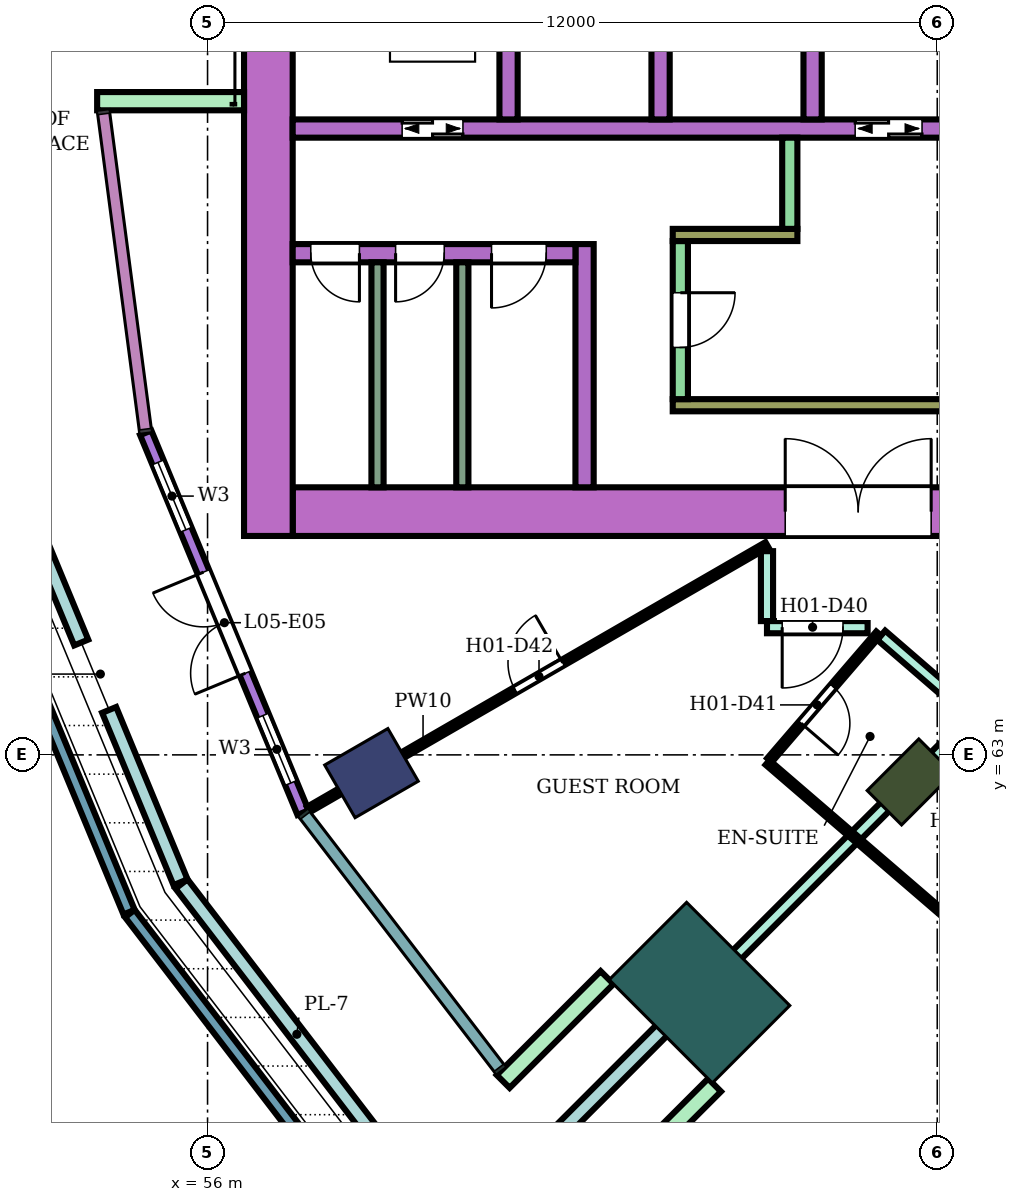
"""IFC4 building model, lengths in metres.
Left out: names, types, materials, properties, quantities, classifications, styles, units other than length and angle.
Written with IfcOpenShell. Run it as: python <this file> out.ifc"""

import sys

from ifc_helpers import new_model, si_unit, direction, frame, frame_2d, origin, origin_2d, place, context, subcontext, project, spatial, rectangle, extrude, element, fill, save


model = new_model("IFC4")
c1 = context("Model", 3, precision=1e-05, world=origin(), true_north=direction((0.0, 1.0)))
c2 = subcontext(c1, "Body", "Model", "MODEL_VIEW")
j1 = project(units=[si_unit("LENGTHUNIT", "METRE"), si_unit("PLANEANGLEUNIT", "RADIAN")], contexts=[c1])
p1 = place(None, origin())
s1 = spatial("IfcSite", under=j1, at=p1, CompositionType="ELEMENT")
p2 = place(p1, origin())
s2 = spatial("IfcBuilding", under=s1, at=p2, CompositionType="ELEMENT")
p3 = place(p2, frame((0.0, 0.0, 28.8)))
s3 = spatial("IfcBuildingStorey", under=s2, at=p3, CompositionType="ELEMENT", Elevation=28.8)
p4 = place(p3, frame((58.696, 62.7, 0.0), z_axis=(0.0, 0.0, 1.0), x_axis=(-0.866025403784, -0.5, 0.0)))
e1 = element("IfcColumn", 1, at=p4, inside=s3, PredefinedType="COLUMN", context=c2, shape_type="SweptSolid", body=[
    extrude(rectangle(XDim=1.2, YDim=1.0, at=origin_2d()), origin(), (0.0, 0.0, 1.0), 3.8),
])
p5 = place(p3, frame((67.555, 62.555, 0.0), z_axis=(0.0, 0.0, 1.0), x_axis=(-0.707106781187, -0.707106781187, 0.0)))
e2 = element("IfcColumn", 2, at=p5, inside=s3, PredefinedType="COLUMN", context=c2, shape_type="SweptSolid", body=[
    extrude(rectangle(XDim=1.2, YDim=0.8, at=origin_2d()), origin(), (0.0, 0.0, 1.0), 3.8),
])
p6 = place(p3, frame((64.09, 59.09, 0.0), z_axis=(0.0, 0.0, 1.0), x_axis=(-0.707106781187, -0.707106781187, 0.0)))
e3 = element("IfcColumn", 3, at=p6, inside=s3, PredefinedType="COLUMN", context=c2, shape_type="SweptSolid", body=[
    extrude(rectangle(XDim=1.8, YDim=2.4, at=origin_2d()), origin(), (0.0, 0.0, 1.0), 3.8),
])
p7 = place(p3, frame((72.1, 67.0, 0.0), z_axis=(0.0, 0.0, 1.0), x_axis=(-1.0, 0.0, 0.0)))
e4 = element("IfcWall", 4, at=p7, inside=s3, PredefinedType="SHEAR", context=c2, shape_type="SweptSolid", body=[
    extrude(rectangle(XDim=14.7, YDim=0.8, at=frame_2d((7.35, 0.0))), origin(), (0.0, 0.0, 1.0), 3.48),
])
p8 = place(p7, frame((4.2, 0.0, 0.0)))
e5 = element("IfcOpeningElement", 5, at=p8, cuts=e4, PredefinedType="OPENING", context=c2, shape_type="SweptSolid", body=[
    extrude(rectangle(XDim=2.4, YDim=2.4, at=frame_2d((1.2, 1.2))), frame((0.0, 0.41, 0.0), z_axis=(0.0, -1.0, 0.0), x_axis=(1.0, 0.0, 0.0)), (0.0, 0.0, 1.0), 0.82),
])
p9 = place(p3, frame((57.0, 83.4, 0.0), z_axis=(0.0, 0.0, 1.0), x_axis=(0.0, -1.0, 0.0)))
e6 = element("IfcWall", 6, at=p9, inside=s3, PredefinedType="SHEAR", context=c2, shape_type="SweptSolid", body=[
    extrude(rectangle(XDim=16.8, YDim=0.8, at=frame_2d((8.4, 0.0))), origin(), (0.0, 0.0, 1.0), 3.48),
])
p10 = place(p3, frame((68.3, 73.3, 0.0), z_axis=(0.0, 0.0, 1.0), x_axis=(-1.0, 0.0, 0.0)))
e7 = element("IfcWall", 7, at=p10, inside=s3, PredefinedType="SHEAR", context=c2, shape_type="SweptSolid", body=[
    extrude(rectangle(XDim=10.9, YDim=0.3, at=frame_2d((5.45, 0.0))), origin(), (0.0, 0.0, 1.0), 3.48),
])
p11 = place(p10, frame((0.55, 0.0, 0.0)))
e8 = element("IfcOpeningElement", 8, at=p11, cuts=e7, PredefinedType="OPENING", context=c2, shape_type="SweptSolid", body=[
    extrude(rectangle(XDim=1.1, YDim=2.1, at=frame_2d((0.55, 1.05))), frame((0.0, 0.16, 0.0), z_axis=(0.0, -1.0, 0.0), x_axis=(1.0, 0.0, 0.0)), (0.0, 0.0, 1.0), 0.32),
])
p12 = place(p10, frame((8.1, 0.0, 0.0)))
e9 = element("IfcOpeningElement", 9, at=p12, cuts=e7, PredefinedType="OPENING", context=c2, shape_type="SweptSolid", body=[
    extrude(rectangle(XDim=1.0, YDim=2.1, at=frame_2d((0.5, 1.05))), frame((0.0, 0.16, 0.0), z_axis=(0.0, -1.0, 0.0), x_axis=(1.0, 0.0, 0.0)), (0.0, 0.0, 1.0), 0.32),
])
for number, where, z_axis, x_axis in (
    (10, (65.95, 76.0, 0.0), (0.0, 0.0, 1.0), (0.0, -1.0, 0.0)),
    (11, (63.45, 76.0, 0.0), (0.0, 0.0, 1.0), (0.0, -1.0, 0.0)),
    (12, (60.95, 76.0, 0.0), (0.0, 0.0, 1.0), (0.0, -1.0, 0.0)),
):
    element("IfcWall", number, at=place(p3, frame(where, z_axis=z_axis, x_axis=x_axis)), inside=s3, PredefinedType="SHEAR", context=c2, shape_type="SweptSolid", body=[
        extrude(rectangle(XDim=2.55, YDim=0.3, at=frame_2d((1.275, 0.0))), origin(), (0.0, 0.0, 1.0), 3.48),
    ])
p13 = place(p3, frame((68.3, 68.75, 0.0), z_axis=(0.0, 0.0, 1.0), x_axis=(-1.0, 0.0, 0.0)))
e13 = element("IfcWall", 13, at=p13, inside=s3, PredefinedType="SHEAR", context=c2, shape_type="SweptSolid", body=[
    extrude(rectangle(XDim=4.65, YDim=0.2, at=frame_2d((2.325, 0.0))), origin(), (0.0, 0.0, 1.0), 3.48),
])
p14 = place(p3, frame((63.775, 71.45, 0.0), z_axis=(0.0, 0.0, 1.0), x_axis=(0.0, -1.0, 0.0)))
e14 = element("IfcWall", 14, at=p14, inside=s3, PredefinedType="SHEAR", context=c2, shape_type="SweptSolid", body=[
    extrude(rectangle(XDim=2.6, YDim=0.25, at=frame_2d((1.3, 0.0))), origin(), (0.0, 0.0, 1.0), 3.48),
])
p15 = place(p14, frame((0.85, 0.0, 0.0)))
e15 = element("IfcOpeningElement", 15, at=p15, cuts=e14, PredefinedType="OPENING", context=c2, shape_type="SweptSolid", body=[
    extrude(rectangle(XDim=0.9, YDim=2.1, at=frame_2d((0.45, 1.05))), frame((0.0, 0.135, 0.0), z_axis=(0.0, -1.0, 0.0), x_axis=(1.0, 0.0, 0.0)), (0.0, 0.0, 1.0), 0.27),
])
p16 = place(p3, frame((65.7, 71.55, 0.0), z_axis=(0.0, 0.0, 1.0), x_axis=(-1.0, 0.0, 0.0)))
e16 = element("IfcWall", 16, at=p16, inside=s3, PredefinedType="SHEAR", context=c2, shape_type="SweptSolid", body=[
    extrude(rectangle(XDim=2.05, YDim=0.2, at=frame_2d((1.025, 0.0))), origin(), (0.0, 0.0, 1.0), 3.48),
])
p17 = place(p3, frame((65.575, 73.15, 0.0), z_axis=(0.0, 0.0, 1.0), x_axis=(0.0, -1.0, 0.0)))
e17 = element("IfcWall", 17, at=p17, inside=s3, PredefinedType="SHEAR", context=c2, shape_type="SweptSolid", body=[
    extrude(rectangle(XDim=1.5, YDim=0.25, at=frame_2d((0.75, 0.0))), origin(), (0.0, 0.0, 1.0), 3.48),
])
p18 = place(p3, frame((62.2, 71.4, 0.0), z_axis=(0.0, 0.0, 1.0), x_axis=(0.0, -1.0, 0.0)))
e18 = element("IfcWall", 18, at=p18, inside=s3, PredefinedType="SHEAR", context=c2, shape_type="SweptSolid", body=[
    extrude(rectangle(XDim=4.0, YDim=0.3, at=frame_2d((2.0, 0.0))), origin(), (0.0, 0.0, 1.0), 3.48),
])
p19 = place(p3, frame((62.05, 71.25, 0.0), z_axis=(0.0, 0.0, 1.0), x_axis=(-1.0, 0.0, 0.0)))
e19 = element("IfcWall", 19, at=p19, inside=s3, PredefinedType="SHEAR", context=c2, shape_type="SweptSolid", body=[
    extrude(rectangle(XDim=4.65, YDim=0.3, at=frame_2d((2.325, 0.0))), origin(), (0.0, 0.0, 1.0), 3.48),
])
p20 = place(p19, frame((0.48, 0.0, 0.0)))
e20 = element("IfcOpeningElement", 20, at=p20, cuts=e19, PredefinedType="OPENING", context=c2, shape_type="SweptSolid", body=[
    extrude(rectangle(XDim=0.9, YDim=2.1, at=frame_2d((0.45, 1.05))), frame((0.0, 0.16, 0.0), z_axis=(0.0, -1.0, 0.0), x_axis=(1.0, 0.0, 0.0)), (0.0, 0.0, 1.0), 0.32),
])
p21 = place(p19, frame((2.157, 0.0, 0.0)))
e21 = element("IfcOpeningElement", 21, at=p21, cuts=e19, PredefinedType="OPENING", context=c2, shape_type="SweptSolid", body=[
    extrude(rectangle(XDim=0.8, YDim=2.1, at=frame_2d((0.4, 1.05))), frame((0.0, 0.16, 0.0), z_axis=(0.0, -1.0, 0.0), x_axis=(1.0, 0.0, 0.0)), (0.0, 0.0, 1.0), 0.32),
])
p22 = place(p19, frame((3.552, 0.0, 0.0)))
e22 = element("IfcOpeningElement", 22, at=p22, cuts=e19, PredefinedType="OPENING", context=c2, shape_type="SweptSolid", body=[
    extrude(rectangle(XDim=0.8, YDim=2.1, at=frame_2d((0.4, 1.05))), frame((0.0, 0.16, 0.0), z_axis=(0.0, -1.0, 0.0), x_axis=(1.0, 0.0, 0.0)), (0.0, 0.0, 1.0), 0.32),
])
p23 = place(p3, frame((54.983, 68.297, 0.0), z_axis=(0.0, 0.0, 1.0), x_axis=(0.382694096902, -0.923875115043, 0.0)))
e23 = element("IfcWall", 23, at=p23, inside=s3, PredefinedType="NOTDEFINED", context=c2, shape_type="SweptSolid", body=[
    extrude(rectangle(XDim=6.761, YDim=0.2, at=frame_2d((3.38, 0.0))), origin(), (0.0, 0.0, 1.0), 3.8),
])
p24 = place(p23, frame((0.527, 0.0, 0.9)))
e24 = element("IfcOpeningElement", 24, at=p24, cuts=e23, PredefinedType="OPENING", context=c2, shape_type="SweptSolid", body=[
    extrude(rectangle(XDim=1.2, YDim=2.4, at=frame_2d((0.6, 1.2))), frame((0.0, 0.11, 0.0), z_axis=(0.0, -1.0, 0.0), x_axis=(1.0, 0.0, 0.0)), (0.0, 0.0, 1.0), 0.22),
])
p25 = place(p23, frame((2.48, 0.0, 0.0)))
e25 = element("IfcOpeningElement", 25, at=p25, cuts=e23, PredefinedType="OPENING", context=c2, shape_type="SweptSolid", body=[
    extrude(rectangle(XDim=1.8, YDim=2.4, at=frame_2d((0.9, 1.2))), frame((0.0, 0.11, 0.0), z_axis=(0.0, -1.0, 0.0), x_axis=(1.0, 0.0, 0.0)), (0.0, 0.0, 1.0), 0.22),
])
p26 = place(p23, frame((5.034, 0.0, 0.9)))
e26 = element("IfcOpeningElement", 26, at=p26, cuts=e23, PredefinedType="OPENING", context=c2, shape_type="SweptSolid", body=[
    extrude(rectangle(XDim=1.2, YDim=2.4, at=frame_2d((0.6, 1.2))), frame((0.0, 0.11, 0.0), z_axis=(0.0, -1.0, 0.0), x_axis=(1.0, 0.0, 0.0)), (0.0, 0.0, 1.0), 0.22),
])
for number, where, z_axis, x_axis in (
    (27, (56.6, 73.75, 0.0), (0.0, 0.0, 1.0), (-1.0, 0.0, 0.0)),
    (28, (62.57, 59.338, 0.0), (0.0, 0.0, 1.0), (-0.707, -0.707, 0.0)),
    (29, (64.338, 57.57, 0.0), (0.0, 0.0, 1.0), (-0.707, -0.707, 0.0)),
):
    element("IfcWall", number, at=place(p3, frame(where, z_axis=z_axis, x_axis=x_axis)), inside=s3, PredefinedType="NOTDEFINED", context=c2, shape_type="SweptSolid", body=[
        extrude(rectangle(XDim=2.416, YDim=0.3, at=frame_2d((1.208, 0.0))), origin(), (0.0, 0.0, 1.0), 3.8),
    ])
p27 = place(p3, frame((59.346, 54.365, 0.0), z_axis=(0.0, 0.0, 1.0), x_axis=(-0.608742572971, 0.793367808682, 0.0)))
e30 = element("IfcWall", 30, at=p27, inside=s3, PredefinedType="PARAPET", context=c2, shape_type="SweptSolid", body=[
    extrude(rectangle(XDim=7.596, YDim=0.2, at=frame_2d((3.798, 0.0))), origin(), (0.0, 0.0, 1.0), 1.1),
])
p28 = place(p3, frame((54.709, 60.414, 0.0), z_axis=(0.0, 0.0, 1.0), x_axis=(-0.382690553965, 0.923876582616, 0.0)))
e31 = element("IfcWall", 31, at=p28, inside=s3, PredefinedType="PARAPET", context=c2, shape_type="SweptSolid", body=[
    extrude(rectangle(XDim=7.595, YDim=0.2, at=frame_2d((3.798, 0.0))), origin(), (0.0, 0.0, 1.0), 1.1),
])
p29 = place(p3, frame((59.365, 55.933, 0.0), z_axis=(0.0, 0.0, 1.0), x_axis=(-0.608758005668, 0.793355967101, 0.0)))
e32 = element("IfcWall", 32, at=p29, inside=s3, PredefinedType="USERDEFINED", context=c2, shape_type="SweptSolid", body=[
    extrude(rectangle(XDim=6.232, YDim=0.25, at=frame_2d((3.116, 0.0))), origin(), (0.0, 0.0, 1.0), 0.6),
])
for number, where, z_axis, x_axis in (
    (33, (55.555, 60.906, 0.0), (0.0, 0.0, 1.0), (-0.383, 0.924, 0.0)),
    (34, (53.923, 64.848, 0.0), (0.0, 0.0, 1.0), (-0.383, 0.924, 0.0)),
):
    element("IfcWall", number, at=place(p3, frame(where, z_axis=z_axis, x_axis=x_axis)), inside=s3, PredefinedType="USERDEFINED", context=c2, shape_type="SweptSolid", body=[
        extrude(rectangle(XDim=3.067, YDim=0.25, at=frame_2d((1.533, 0.0))), origin(), (0.0, 0.0, 1.0), 0.6),
    ])
p30 = place(p3, frame((60.124, 55.124, 0.0), z_axis=(0.0, 0.0, 1.0), x_axis=(0.707106781187, 0.707106781187, 0.0)))
e35 = element("IfcWall", 35, at=p30, inside=s3, PredefinedType="USERDEFINED", context=c2, shape_type="SweptSolid", body=[
    extrude(rectangle(XDim=4.909, YDim=0.25, at=frame_2d((2.455, 0.0))), origin(), (0.0, 0.0, 1.0), 0.6),
])
p31 = place(p3, frame((63.592, 58.599, 0.0), z_axis=(0.0, 0.0, 1.0), x_axis=(0.707228748718, 0.706984792613, 0.0)))
e36 = element("IfcWall", 36, at=p31, inside=s3, PredefinedType="PARTITIONING", context=c2, shape_type="SweptSolid", body=[
    extrude(rectangle(XDim=7.005, YDim=0.2, at=frame_2d((3.503, 0.0))), origin(), (0.0, 0.0, 1.0), 3.35),
])
p32 = place(p3, frame((65.2, 65.2, 0.0), z_axis=(0.0, 0.0, 1.0), x_axis=(0.0, 1.0, 0.0)))
e37 = element("IfcWall", 37, at=p32, inside=s3, PredefinedType="PARTITIONING", context=c2, shape_type="SweptSolid", body=[
    extrude(rectangle(XDim=1.15, YDim=0.2, at=frame_2d((0.575, 0.0))), origin(), (0.0, 0.0, 1.0), 3.35),
])
p33 = place(p3, frame((65.2, 65.1, 0.0), z_axis=(0.0, 0.0, 1.0), x_axis=(1.0, 0.0, 0.0)))
e38 = element("IfcWall", 38, at=p33, inside=s3, PredefinedType="PARTITIONING", context=c2, shape_type="SweptSolid", body=[
    extrude(rectangle(XDim=1.655, YDim=0.2, at=frame_2d((0.828, 0.0))), origin(), (0.0, 0.0, 1.0), 3.35),
])
p34 = place(p33, frame((0.25, 0.0, 0.0)))
e39 = element("IfcOpeningElement", 39, at=p34, cuts=e38, PredefinedType="OPENING", context=c2, shape_type="SweptSolid", body=[
    extrude(rectangle(XDim=1.0, YDim=2.1, at=frame_2d((0.5, 1.05))), frame((0.0, 0.11, 0.0), z_axis=(0.0, -1.0, 0.0), x_axis=(1.0, 0.0, 0.0)), (0.0, 0.0, 1.0), 0.22),
])
p35 = place(p3, frame((67.078, 64.968, 0.0), z_axis=(0.0, 0.0, 1.0), x_axis=(0.756371089567, -0.654142778656, 0.0)))
e40 = element("IfcWall", 40, at=p35, inside=s3, PredefinedType="PARTITIONING", context=c2, shape_type="SweptSolid", body=[
    extrude(rectangle(XDim=6.185, YDim=0.2, at=frame_2d((3.093, 0.0))), origin(), (0.0, 0.0, 1.0), 3.35),
])
p36 = place(p35, frame((4.755, 0.0, 0.0)))
e41 = element("IfcOpeningElement", 41, at=p36, cuts=e40, PredefinedType="OPENING", context=c2, shape_type="SweptSolid", body=[
    extrude(rectangle(XDim=1.0, YDim=2.1, at=frame_2d((0.5, 1.05))), frame((0.0, 0.11, 0.0), z_axis=(0.0, -1.0, 0.0), x_axis=(1.0, 0.0, 0.0)), (0.0, 0.0, 1.0), 0.22),
])
p37 = place(p3, frame((67.096, 52.662, 0.0), z_axis=(0.0, 0.0, 1.0), x_axis=(0.500242450002, 0.865885379953, 0.0)))
e42 = element("IfcWall", 42, at=p37, inside=s3, PredefinedType="PARTITIONING", context=c2, shape_type="SweptSolid", body=[
    extrude(rectangle(XDim=9.374, YDim=0.2, at=frame_2d((4.687, 0.0))), origin(), (0.0, 0.0, 1.0), 3.35),
])
p38 = place(p3, frame((57.659, 62.101, 0.0), z_axis=(0.0, 0.0, 1.0), x_axis=(0.86602264145, 0.500004784474, 0.0)))
e43 = element("IfcWall", 43, at=p38, inside=s3, PredefinedType="PARTITIONING", context=c2, shape_type="SweptSolid", body=[
    extrude(rectangle(XDim=8.708, YDim=0.1, at=frame_2d((4.354, 0.0))), origin(), (0.0, 0.0, 1.0), 3.35),
])
p39 = place(p38, frame((3.929, 0.0, 0.0)))
e44 = element("IfcOpeningElement", 44, at=p39, cuts=e43, PredefinedType="OPENING", context=c2, shape_type="SweptSolid", body=[
    extrude(rectangle(XDim=0.9, YDim=2.1, at=frame_2d((0.45, 1.05))), frame((0.0, 0.06, 0.0), z_axis=(0.0, -1.0, 0.0), x_axis=(1.0, 0.0, 0.0)), (0.0, 0.0, 1.0), 0.12),
])
p40 = place(p3, frame((65.242, 62.912, 0.0), z_axis=(0.0, 0.0, 1.0), x_axis=(0.652069888227, 0.758158862553, 0.0)))
e45 = element("IfcWall", 45, at=p40, inside=s3, PredefinedType="PARTITIONING", context=c2, shape_type="SweptSolid", body=[
    extrude(rectangle(XDim=2.75, YDim=0.1, at=frame_2d((1.375, 0.0))), origin(), (0.0, 0.0, 1.0), 3.35),
])
p41 = place(p40, frame((0.8, 0.0, 0.0)))
e46 = element("IfcOpeningElement", 46, at=p41, cuts=e45, PredefinedType="OPENING", context=c2, shape_type="SweptSolid", body=[
    extrude(rectangle(XDim=0.8, YDim=2.1, at=frame_2d((0.4, 1.05))), frame((0.0, 0.06, 0.0), z_axis=(0.0, -1.0, 0.0), x_axis=(1.0, 0.0, 0.0)), (0.0, 0.0, 1.0), 0.12),
])
p42 = place(p3, frame((65.209, 62.875, 0.0), z_axis=(0.0, 0.0, 1.0), x_axis=(0.757930378138, -0.652335451969, 0.0)))
e47 = element("IfcWall", 47, at=p42, inside=s3, PredefinedType="PARTITIONING", context=c2, shape_type="SweptSolid", body=[
    extrude(rectangle(XDim=4.15, YDim=0.1, at=frame_2d((2.075, 0.0))), origin(), (0.0, 0.0, 1.0), 3.35),
])
for number, where, z_axis, x_axis in (
    (48, (60.19, 71.1, 0.0), (0.0, 0.0, 1.0), (0.0, -1.0, 0.0)),
    (49, (58.795, 71.1, 0.0), (0.0, 0.0, 1.0), (0.0, -1.0, 0.0)),
):
    element("IfcWall", number, at=place(p3, frame(where, z_axis=z_axis, x_axis=x_axis)), inside=s3, PredefinedType="PARTITIONING", context=c2, shape_type="SweptSolid", body=[
        extrude(rectangle(XDim=3.7, YDim=0.2, at=frame_2d((1.85, 0.0))), origin(), (0.0, 0.0, 1.0), 3.48),
    ])
p43 = place(p24, origin())
e50 = element("IfcWindow", 50, at=p43, inside=s3, PartitioningType="SINGLE_PANEL", PredefinedType="WINDOW", context=c2, shape_type="SweptSolid", body=[
    extrude(rectangle(XDim=1.2, YDim=2.4, at=frame_2d((0.6, 1.2))), frame((0.0, 0.03, 0.0), z_axis=(0.0, -1.0, 0.0), x_axis=(1.0, 0.0, 0.0)), (0.0, 0.0, 1.0), 0.06),
])
fill(e24, e50)
p44 = place(p25, frame((1.8, 0.0, 0.0), z_axis=(0.0, 0.0, 1.0), x_axis=(-1.0, 0.0, 0.0)))
e51 = element("IfcDoor", 51, at=p44, inside=s3, OperationType="DOUBLE_DOOR_SINGLE_SWING", PredefinedType="DOOR", context=c2, shape_type="SweptSolid", body=[
    extrude(rectangle(XDim=1.8, YDim=2.4, at=frame_2d((0.9, 1.2))), frame((0.0, 0.025, 0.0), z_axis=(0.0, -1.0, 0.0), x_axis=(1.0, 0.0, 0.0)), (0.0, 0.0, 1.0), 0.05),
])
fill(e25, e51)
p45 = place(p26, origin())
e52 = element("IfcWindow", 52, at=p45, inside=s3, PartitioningType="SINGLE_PANEL", PredefinedType="WINDOW", context=c2, shape_type="SweptSolid", body=[
    extrude(rectangle(XDim=1.2, YDim=2.4, at=frame_2d((0.6, 1.2))), frame((0.0, 0.03, 0.0), z_axis=(0.0, -1.0, 0.0), x_axis=(1.0, 0.0, 0.0)), (0.0, 0.0, 1.0), 0.06),
])
fill(e26, e52)
p46 = place(p34, frame((1.0, 0.0, 0.0), z_axis=(0.0, 0.0, 1.0), x_axis=(-1.0, 0.0, 0.0)))
e53 = element("IfcDoor", 53, at=p46, inside=s3, OperationType="SINGLE_SWING_RIGHT", PredefinedType="DOOR", context=c2, shape_type="SweptSolid", body=[
    extrude(rectangle(XDim=1.0, YDim=2.1, at=frame_2d((0.5, 1.05))), frame((0.0, 0.025, 0.0), z_axis=(0.0, -1.0, 0.0), x_axis=(1.0, 0.0, 0.0)), (0.0, 0.0, 1.0), 0.05),
])
fill(e39, e53)
p47 = place(p41, frame((0.8, 0.0, 0.0), z_axis=(0.0, 0.0, 1.0), x_axis=(-1.0, 0.0, 0.0)))
e54 = element("IfcDoor", 54, at=p47, inside=s3, OperationType="SINGLE_SWING_RIGHT", PredefinedType="DOOR", context=c2, shape_type="SweptSolid", body=[
    extrude(rectangle(XDim=0.8, YDim=2.1, at=frame_2d((0.4, 1.05))), frame((0.0, 0.025, 0.0), z_axis=(0.0, -1.0, 0.0), x_axis=(1.0, 0.0, 0.0)), (0.0, 0.0, 1.0), 0.05),
])
fill(e46, e54)
p48 = place(p39, origin())
e55 = element("IfcDoor", 55, at=p48, inside=s3, OperationType="SINGLE_SWING_RIGHT", PredefinedType="DOOR", context=c2, shape_type="SweptSolid", body=[
    extrude(rectangle(XDim=0.9, YDim=2.1, at=frame_2d((0.45, 1.05))), frame((0.0, 0.025, 0.0), z_axis=(0.0, -1.0, 0.0), x_axis=(1.0, 0.0, 0.0)), (0.0, 0.0, 1.0), 0.05),
])
fill(e44, e55)
p49 = place(p11, origin())
e56 = element("IfcDoor", 56, at=p49, inside=s3, OperationType="DOUBLE_DOOR_SLIDING", PredefinedType="DOOR", context=c2, shape_type="SweptSolid", body=[
    extrude(rectangle(XDim=1.1, YDim=2.1, at=frame_2d((0.55, 1.05))), frame((0.0, 0.025, 0.0), z_axis=(0.0, -1.0, 0.0), x_axis=(1.0, 0.0, 0.0)), (0.0, 0.0, 1.0), 0.05),
])
fill(e8, e56)
p50 = place(p12, origin())
e57 = element("IfcDoor", 57, at=p50, inside=s3, OperationType="DOUBLE_DOOR_SLIDING", PredefinedType="DOOR", context=c2, shape_type="SweptSolid", body=[
    extrude(rectangle(XDim=1.0, YDim=2.1, at=frame_2d((0.5, 1.05))), frame((0.0, 0.025, 0.0), z_axis=(0.0, -1.0, 0.0), x_axis=(1.0, 0.0, 0.0)), (0.0, 0.0, 1.0), 0.05),
])
fill(e9, e57)
p51 = place(p15, origin())
e58 = element("IfcDoor", 58, at=p51, inside=s3, OperationType="SINGLE_SWING_LEFT", PredefinedType="DOOR", context=c2, shape_type="SweptSolid", body=[
    extrude(rectangle(XDim=0.9, YDim=2.1, at=frame_2d((0.45, 1.05))), frame((0.0, 0.025, 0.0), z_axis=(0.0, -1.0, 0.0), x_axis=(1.0, 0.0, 0.0)), (0.0, 0.0, 1.0), 0.05),
])
fill(e15, e58)
p52 = place(p20, origin())
e59 = element("IfcDoor", 59, at=p52, inside=s3, OperationType="SINGLE_SWING_RIGHT", PredefinedType="DOOR", context=c2, shape_type="SweptSolid", body=[
    extrude(rectangle(XDim=0.9, YDim=2.1, at=frame_2d((0.45, 1.05))), frame((0.0, 0.025, 0.0), z_axis=(0.0, -1.0, 0.0), x_axis=(1.0, 0.0, 0.0)), (0.0, 0.0, 1.0), 0.05),
])
fill(e20, e59)
p53 = place(p21, origin())
e60 = element("IfcDoor", 60, at=p53, inside=s3, OperationType="SINGLE_SWING_RIGHT", PredefinedType="DOOR", context=c2, shape_type="SweptSolid", body=[
    extrude(rectangle(XDim=0.8, YDim=2.1, at=frame_2d((0.4, 1.05))), frame((0.0, 0.025, 0.0), z_axis=(0.0, -1.0, 0.0), x_axis=(1.0, 0.0, 0.0)), (0.0, 0.0, 1.0), 0.05),
])
fill(e21, e60)
p54 = place(p22, origin())
e61 = element("IfcDoor", 61, at=p54, inside=s3, OperationType="SINGLE_SWING_LEFT", PredefinedType="DOOR", context=c2, shape_type="SweptSolid", body=[
    extrude(rectangle(XDim=0.8, YDim=2.1, at=frame_2d((0.4, 1.05))), frame((0.0, 0.025, 0.0), z_axis=(0.0, -1.0, 0.0), x_axis=(1.0, 0.0, 0.0)), (0.0, 0.0, 1.0), 0.05),
])
fill(e22, e61)
p55 = place(p8, frame((2.4, 0.0, 0.0), z_axis=(0.0, 0.0, 1.0), x_axis=(-1.0, 0.0, 0.0)))
e62 = element("IfcDoor", 62, at=p55, inside=s3, OperationType="DOUBLE_DOOR_SINGLE_SWING", PredefinedType="DOOR", context=c2, shape_type="SweptSolid", body=[
    extrude(rectangle(XDim=2.4, YDim=2.4, at=frame_2d((1.2, 1.2))), frame((0.0, 0.025, 0.0), z_axis=(0.0, -1.0, 0.0), x_axis=(1.0, 0.0, 0.0)), (0.0, 0.0, 1.0), 0.05),
])
fill(e5, e62)
save(model, sys.argv[1])
